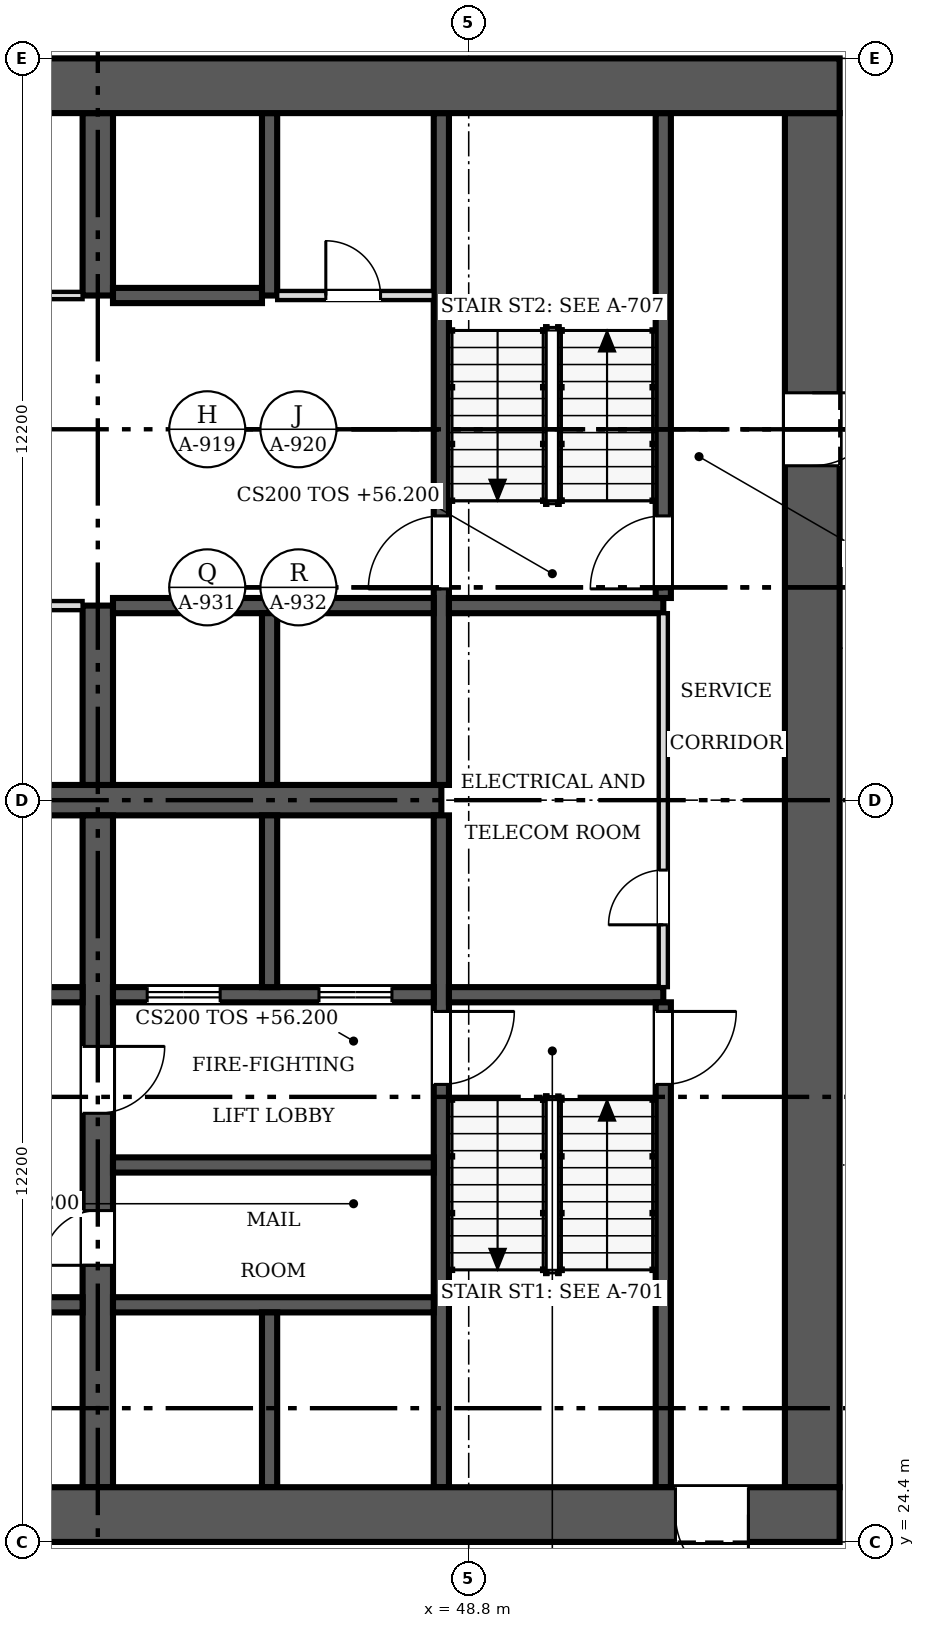
"""IFC4 building model, lengths in metres.
Left out: names, types, materials, properties, quantities, classifications, styles, units other than length and angle.
Written with IfcOpenShell. Run it as: python <this file> out.ifc"""

import sys

from ifc_helpers import new_model, si_unit, direction, frame, frame_2d, origin, place, context, subcontext, project, spatial, rectangle, extrude, source, transform, mapped, element, fill, save


model = new_model("IFC4")
c1 = context("Model", 3, precision=1e-05, world=origin(), true_north=direction((0.0, 1.0)))
c2 = subcontext(c1, "Body", "Model", "MODEL_VIEW")
j1 = project(units=[si_unit("LENGTHUNIT", "METRE"), si_unit("PLANEANGLEUNIT", "RADIAN")], contexts=[c1])
p1 = place(None, origin())
s1 = spatial("IfcSite", under=j1, at=p1, CompositionType="ELEMENT")
p2 = place(p1, origin())
s2 = spatial("IfcBuilding", under=s1, at=p2, CompositionType="ELEMENT")
p3 = place(p2, frame((0.0, 0.0, 56.2)))
s3 = spatial("IfcBuildingStorey", under=s2, at=p3, CompositionType="ELEMENT", Elevation=56.2)
p4 = place(p3, frame((54.9, 24.85, 0.0), z_axis=(0.0, 0.0, 1.0), x_axis=(-1.0, 0.0, 0.0)))
e1 = element("IfcWall", 1, at=p4, inside=s3, PredefinedType="SHEAR", context=c2, shape_type="SweptSolid", body=[
    extrude(rectangle(XDim=24.4, YDim=0.9, at=frame_2d((12.2, 0.0))), origin(), (0.0, 0.0, 1.0), 3.8),
])
m1 = source(origin(), c2, "Body", "SweptSolid", [
    extrude(rectangle(XDim=1.2, YDim=2.1, at=frame_2d((0.6, 1.05))), frame((0.0, 0.46, 0.0), z_axis=(0.0, -1.0, 0.0), x_axis=(1.0, 0.0, 0.0)), (0.0, 0.0, 1.0), 0.92),
])
p5 = place(p4, frame((1.5, 0.0, 0.0)))
e2 = element("IfcOpeningElement", 2, at=p5, cuts=e1, PredefinedType="OPENING", context=c2, shape_type="MappedRepresentation", body=[
    mapped(m1, transform((0.0, 0.0, 0.0), scale=1.0)),
])
p6 = place(p3, frame((30.5, 48.35, 0.0), z_axis=(0.0, 0.0, 1.0), x_axis=(1.0, 0.0, 0.0)))
e3 = element("IfcWall", 3, at=p6, inside=s3, PredefinedType="SHEAR", context=c2, shape_type="SweptSolid", body=[
    extrude(rectangle(XDim=24.4, YDim=0.9, at=frame_2d((12.2, 0.0))), origin(), (0.0, 0.0, 1.0), 3.8),
])
p7 = place(p3, frame((54.45, 47.9, 0.0), z_axis=(0.0, 0.0, 1.0), x_axis=(0.0, -1.0, 0.0)))
e4 = element("IfcWall", 4, at=p7, inside=s3, PredefinedType="SHEAR", context=c2, shape_type="SweptSolid", body=[
    extrude(rectangle(XDim=22.6, YDim=0.9, at=frame_2d((11.3, 0.0))), origin(), (0.0, 0.0, 1.0), 3.8),
])
p8 = place(p7, frame((4.6, 0.0, 0.0)))
e5 = element("IfcOpeningElement", 5, at=p8, cuts=e4, PredefinedType="OPENING", context=c2, shape_type="MappedRepresentation", body=[
    mapped(m1, transform((0.0, 0.0, 0.0), scale=1.0)),
])
p9 = place(p3, frame((31.4, 36.6, 0.0), z_axis=(0.0, 0.0, 1.0), x_axis=(1.0, 0.0, 0.0)))
e6 = element("IfcWall", 6, at=p9, inside=s3, PredefinedType="SHEAR", context=c2, shape_type="SweptSolid", body=[
    extrude(rectangle(XDim=16.95, YDim=0.5, at=frame_2d((8.475, 0.0))), origin(), (0.0, 0.0, 1.0), 3.8),
])
p10 = place(p3, frame((42.7, 36.35, 0.0), z_axis=(0.0, 0.0, 1.0), x_axis=(0.0, -1.0, 0.0)))
e7 = element("IfcWall", 7, at=p10, inside=s3, PredefinedType="SHEAR", context=c2, shape_type="SweptSolid", body=[
    extrude(rectangle(XDim=11.05, YDim=0.5, at=frame_2d((5.525, 0.0))), origin(), (0.0, 0.0, 1.0), 3.8),
])
m2 = source(origin(), c2, "Body", "SweptSolid", [
    extrude(rectangle(XDim=0.9, YDim=2.1, at=frame_2d((0.45, 1.05))), frame((0.0, 0.26, 0.0), z_axis=(0.0, -1.0, 0.0), x_axis=(1.0, 0.0, 0.0)), (0.0, 0.0, 1.0), 0.52),
])
p11 = place(p10, frame((6.5, 0.0, 0.0)))
e8 = element("IfcOpeningElement", 8, at=p11, cuts=e7, PredefinedType="OPENING", context=c2, shape_type="MappedRepresentation", body=[
    mapped(m2, transform((0.0, 0.0, 0.0), scale=1.0)),
])
m3 = source(origin(), c2, "Body", "SweptSolid", [
    extrude(rectangle(XDim=1.1, YDim=2.1, at=frame_2d((0.55, 1.05))), frame((0.0, 0.26, 0.0), z_axis=(0.0, -1.0, 0.0), x_axis=(1.0, 0.0, 0.0)), (0.0, 0.0, 1.0), 0.52),
])
p12 = place(p10, frame((3.8, 0.0, 0.0)))
e9 = element("IfcOpeningElement", 9, at=p12, cuts=e7, PredefinedType="OPENING", context=c2, shape_type="MappedRepresentation", body=[
    mapped(m3, transform((0.0, 0.0, 0.0), scale=1.0)),
])
p13 = place(p3, frame((42.7, 36.85, 0.0), z_axis=(0.0, 0.0, 1.0), x_axis=(0.0, 1.0, 0.0)))
e10 = element("IfcWall", 10, at=p13, inside=s3, PredefinedType="SHEAR", context=c2, shape_type="SweptSolid", body=[
    extrude(rectangle(XDim=2.95, YDim=0.5, at=frame_2d((1.475, 0.0))), origin(), (0.0, 0.0, 1.0), 3.8),
])
p14 = place(p3, frame((42.7, 44.9, 0.0), z_axis=(0.0, 0.0, 1.0), x_axis=(0.0, 1.0, 0.0)))
e11 = element("IfcWall", 11, at=p14, inside=s3, PredefinedType="SHEAR", context=c2, shape_type="SweptSolid", body=[
    extrude(rectangle(XDim=3.0, YDim=0.5, at=frame_2d((1.5, 0.0))), origin(), (0.0, 0.0, 1.0), 3.8),
])
p15 = place(p3, frame((48.35, 36.35, 0.0), z_axis=(0.0, 0.0, 1.0), x_axis=(0.0, -1.0, 0.0)))
e12 = element("IfcWall", 12, at=p15, inside=s3, PredefinedType="SOLIDWALL", context=c2, shape_type="SweptSolid", body=[
    extrude(rectangle(XDim=11.05, YDim=0.25, at=frame_2d((5.525, 0.0))), origin(), (0.0, 0.0, 1.0), 3.8),
])
m4 = source(origin(), c2, "Body", "SweptSolid", [
    extrude(rectangle(XDim=1.2, YDim=2.1, at=frame_2d((0.6, 1.05))), frame((0.0, 0.135, 0.0), z_axis=(0.0, -1.0, 0.0), x_axis=(1.0, 0.0, 0.0)), (0.0, 0.0, 1.0), 0.27),
])
p16 = place(p15, frame((3.225, 0.0, 0.0)))
e13 = element("IfcOpeningElement", 13, at=p16, cuts=e12, PredefinedType="OPENING", context=c2, shape_type="MappedRepresentation", body=[
    mapped(m4, transform((0.0, 0.0, 0.0), scale=1.0)),
])
p17 = place(p3, frame((48.35, 47.9, 0.0), z_axis=(0.0, 0.0, 1.0), x_axis=(0.0, -1.0, 0.0)))
e14 = element("IfcWall", 14, at=p17, inside=s3, PredefinedType="SOLIDWALL", context=c2, shape_type="SweptSolid", body=[
    extrude(rectangle(XDim=11.05, YDim=0.25, at=frame_2d((5.525, 0.0))), origin(), (0.0, 0.0, 1.0), 3.8),
])
p18 = place(p17, frame((6.625, 0.0, 0.0)))
e15 = element("IfcOpeningElement", 15, at=p18, cuts=e14, PredefinedType="OPENING", context=c2, shape_type="MappedRepresentation", body=[
    mapped(m4, transform((0.0, 0.0, 0.0), scale=1.0)),
])
p19 = place(p3, frame((42.45, 33.4, 0.0), z_axis=(0.0, 0.0, 1.0), x_axis=(-1.0, 0.0, 0.0)))
e16 = element("IfcWall", 16, at=p19, inside=s3, PredefinedType="SOLIDWALL", context=c2, shape_type="SweptSolid", body=[
    extrude(rectangle(XDim=11.05, YDim=0.25, at=frame_2d((5.525, 0.0))), origin(), (0.0, 0.0, 1.0), 3.8),
])
m5 = source(origin(), c2, "Body", "SweptSolid", [
    extrude(rectangle(XDim=1.1, YDim=2.1, at=frame_2d((0.55, 1.05))), frame((0.0, 0.135, 0.0), z_axis=(0.0, -1.0, 0.0), x_axis=(1.0, 0.0, 0.0)), (0.0, 0.0, 1.0), 0.27),
])
p20 = place(p19, frame((9.087, 0.0, 0.0)))
e17 = element("IfcOpeningElement", 17, at=p20, cuts=e16, PredefinedType="OPENING", context=c2, shape_type="MappedRepresentation", body=[
    mapped(m5, transform((0.0, 0.0, 0.0), scale=1.0)),
])
p21 = place(p19, frame((6.262, 0.0, 0.0)))
e18 = element("IfcOpeningElement", 18, at=p21, cuts=e16, PredefinedType="OPENING", context=c2, shape_type="MappedRepresentation", body=[
    mapped(m5, transform((0.0, 0.0, 0.0), scale=1.0)),
])
p22 = place(p19, frame((3.438, 0.0, 0.0)))
e19 = element("IfcOpeningElement", 19, at=p22, cuts=e16, PredefinedType="OPENING", context=c2, shape_type="MappedRepresentation", body=[
    mapped(m5, transform((0.0, 0.0, 0.0), scale=1.0)),
])
p23 = place(p19, frame((0.613, 0.0, 0.0)))
e20 = element("IfcOpeningElement", 20, at=p23, cuts=e16, PredefinedType="OPENING", context=c2, shape_type="MappedRepresentation", body=[
    mapped(m5, transform((0.0, 0.0, 0.0), scale=1.0)),
])
p24 = place(p3, frame((48.225, 33.4, 0.0), z_axis=(0.0, 0.0, 1.0), x_axis=(-1.0, 0.0, 0.0)))
e21 = element("IfcWall", 21, at=p24, inside=s3, PredefinedType="SOLIDWALL", context=c2, shape_type="SweptSolid", body=[
    extrude(rectangle(XDim=5.275, YDim=0.25, at=frame_2d((2.638, 0.0))), origin(), (0.0, 0.0, 1.0), 3.8),
])
p25 = place(p24, frame((3.512, 0.0, 0.0)))
e22 = element("IfcOpeningElement", 22, at=p25, cuts=e21, PredefinedType="OPENING", context=c2, shape_type="MappedRepresentation", body=[
    mapped(m4, transform((0.0, 0.0, 0.0), scale=1.0)),
])
p26 = place(p24, frame((0.688, 0.0, 0.0)))
e23 = element("IfcOpeningElement", 23, at=p26, cuts=e21, PredefinedType="OPENING", context=c2, shape_type="MappedRepresentation", body=[
    mapped(m4, transform((0.0, 0.0, 0.0), scale=1.0)),
])
p27 = place(p3, frame((48.475, 33.4, 0.0), z_axis=(0.0, 0.0, 1.0), x_axis=(1.0, 0.0, 0.0)))
e24 = element("IfcWall", 24, at=p27, inside=s3, PredefinedType="SOLIDWALL", context=c2, shape_type="SweptSolid", body=[
    extrude(rectangle(XDim=3.525, YDim=0.25, at=frame_2d((1.762, 0.0))), origin(), (0.0, 0.0, 1.0), 3.8),
])
p28 = place(p3, frame((31.4, 28.3, 0.0), z_axis=(0.0, 0.0, 1.0), x_axis=(1.0, 0.0, 0.0)))
e25 = element("IfcWall", 25, at=p28, inside=s3, PredefinedType="SOLIDWALL", context=c2, shape_type="SweptSolid", body=[
    extrude(rectangle(XDim=11.05, YDim=0.25, at=frame_2d((5.525, 0.0))), origin(), (0.0, 0.0, 1.0), 3.8),
])
p29 = place(p28, frame((0.863, 0.0, 0.0)))
e26 = element("IfcOpeningElement", 26, at=p29, cuts=e25, PredefinedType="OPENING", context=c2, shape_type="MappedRepresentation", body=[
    mapped(m5, transform((0.0, 0.0, 0.0), scale=1.0)),
])
p30 = place(p28, frame((3.688, 0.0, 0.0)))
e27 = element("IfcOpeningElement", 27, at=p30, cuts=e25, PredefinedType="OPENING", context=c2, shape_type="MappedRepresentation", body=[
    mapped(m5, transform((0.0, 0.0, 0.0), scale=1.0)),
])
p31 = place(p28, frame((6.512, 0.0, 0.0)))
e28 = element("IfcOpeningElement", 28, at=p31, cuts=e25, PredefinedType="OPENING", context=c2, shape_type="MappedRepresentation", body=[
    mapped(m5, transform((0.0, 0.0, 0.0), scale=1.0)),
])
p32 = place(p28, frame((9.337, 0.0, 0.0)))
e29 = element("IfcOpeningElement", 29, at=p32, cuts=e25, PredefinedType="OPENING", context=c2, shape_type="MappedRepresentation", body=[
    mapped(m5, transform((0.0, 0.0, 0.0), scale=1.0)),
])
for number, where, z_axis, x_axis in (
    (30, (42.95, 28.3, 0.0), (0.0, 0.0, 1.0), (1.0, 0.0, 0.0)),
    (31, (42.95, 39.8, 0.0), (0.0, 0.0, 1.0), (1.0, 0.0, 0.0)),
):
    element("IfcWall", number, at=place(p3, frame(where, z_axis=z_axis, x_axis=x_axis)), inside=s3, PredefinedType="SOLIDWALL", context=c2, shape_type="SweptSolid", body=[
        extrude(rectangle(XDim=5.275, YDim=0.25, at=frame_2d((2.638, 0.0))), origin(), (0.0, 0.0, 1.0), 3.8),
    ])
p33 = place(p3, frame((48.475, 39.8, 0.0), z_axis=(0.0, 0.0, 1.0), x_axis=(1.0, 0.0, 0.0)))
e32 = element("IfcWall", 32, at=p33, inside=s3, PredefinedType="SOLIDWALL", context=c2, shape_type="SweptSolid", body=[
    extrude(rectangle(XDim=3.525, YDim=0.25, at=frame_2d((1.762, 0.0))), origin(), (0.0, 0.0, 1.0), 3.8),
])
p34 = place(p3, frame((52.0, 25.3, 0.0), z_axis=(0.0, 0.0, 1.0), x_axis=(0.0, 1.0, 0.0)))
e33 = element("IfcWall", 33, at=p34, inside=s3, PredefinedType="SOLIDWALL", context=c2, shape_type="SweptSolid", body=[
    extrude(rectangle(XDim=7.975, YDim=0.25, at=frame_2d((3.987, 0.0))), origin(), (0.0, 0.0, 1.0), 3.8),
])
p35 = place(p34, frame((6.625, 0.0, 0.0)))
e34 = element("IfcOpeningElement", 34, at=p35, cuts=e33, PredefinedType="OPENING", context=c2, shape_type="MappedRepresentation", body=[
    mapped(m4, transform((0.0, 0.0, 0.0), scale=1.0)),
])
p36 = place(p3, frame((52.0, 39.925, 0.0), z_axis=(0.0, 0.0, 1.0), x_axis=(0.0, 1.0, 0.0)))
e35 = element("IfcWall", 35, at=p36, inside=s3, PredefinedType="SOLIDWALL", context=c2, shape_type="SweptSolid", body=[
    extrude(rectangle(XDim=7.975, YDim=0.25, at=frame_2d((3.987, 0.0))), origin(), (0.0, 0.0, 1.0), 3.8),
])
p37 = place(p36, frame((0.15, 0.0, 0.0)))
e36 = element("IfcOpeningElement", 36, at=p37, cuts=e35, PredefinedType="OPENING", context=c2, shape_type="MappedRepresentation", body=[
    mapped(m4, transform((0.0, 0.0, 0.0), scale=1.0)),
])
p38 = place(p3, frame((45.525, 33.525, 0.0), z_axis=(0.0, 0.0, 1.0), x_axis=(0.0, 1.0, 0.0)))
e37 = element("IfcWall", 37, at=p38, inside=s3, PredefinedType="SOLIDWALL", context=c2, shape_type="SweptSolid", body=[
    extrude(rectangle(XDim=2.825, YDim=0.25, at=frame_2d((1.413, 0.0))), origin(), (0.0, 0.0, 1.0), 3.8),
])
p39 = place(p3, frame((45.525, 36.85, 0.0), z_axis=(0.0, 0.0, 1.0), x_axis=(0.0, 1.0, 0.0)))
e38 = element("IfcWall", 38, at=p39, inside=s3, PredefinedType="SOLIDWALL", context=c2, shape_type="SweptSolid", body=[
    extrude(rectangle(XDim=2.825, YDim=0.25, at=frame_2d((1.413, 0.0))), origin(), (0.0, 0.0, 1.0), 3.8),
])
p40 = place(p3, frame((42.95, 30.6, 0.0), z_axis=(0.0, 0.0, 1.0), x_axis=(1.0, 0.0, 0.0)))
e39 = element("IfcWall", 39, at=p40, inside=s3, PredefinedType="SOLIDWALL", context=c2, shape_type="SweptSolid", body=[
    extrude(rectangle(XDim=5.275, YDim=0.25, at=frame_2d((2.638, 0.0))), origin(), (0.0, 0.0, 1.0), 3.8),
])
p41 = place(p3, frame((45.525, 25.3, 0.0), z_axis=(0.0, 0.0, 1.0), x_axis=(0.0, 1.0, 0.0)))
e40 = element("IfcWall", 40, at=p41, inside=s3, PredefinedType="SOLIDWALL", context=c2, shape_type="SweptSolid", body=[
    extrude(rectangle(XDim=2.875, YDim=0.25, at=frame_2d((1.438, 0.0))), origin(), (0.0, 0.0, 1.0), 3.8),
])
p42 = place(p3, frame((45.525, 44.9, 0.0), z_axis=(0.0, 0.0, 1.0), x_axis=(0.0, 1.0, 0.0)))
e41 = element("IfcWall", 41, at=p42, inside=s3, PredefinedType="SOLIDWALL", context=c2, shape_type="SweptSolid", body=[
    extrude(rectangle(XDim=3.0, YDim=0.25, at=frame_2d((1.5, 0.0))), origin(), (0.0, 0.0, 1.0), 3.8),
])
p43 = place(p3, frame((42.95, 44.9, 0.0), z_axis=(0.0, 0.0, 1.0), x_axis=(1.0, 0.0, 0.0)))
e42 = element("IfcWall", 42, at=p43, inside=s3, PredefinedType="SOLIDWALL", context=c2, shape_type="SweptSolid", body=[
    extrude(rectangle(XDim=2.45, YDim=0.25, at=frame_2d((1.225, 0.0))), origin(), (0.0, 0.0, 1.0), 3.8),
])
p44 = place(p3, frame((42.45, 39.8, 0.0), z_axis=(0.0, 0.0, 1.0), x_axis=(-1.0, 0.0, 0.0)))
e43 = element("IfcWall", 43, at=p44, inside=s3, PredefinedType="PARTITIONING", context=c2, shape_type="SweptSolid", body=[
    extrude(rectangle(XDim=11.05, YDim=0.15, at=frame_2d((5.525, 0.0))), origin(), (0.0, 0.0, 1.0), 3.6),
])
m6 = source(origin(), c2, "Body", "SweptSolid", [
    extrude(rectangle(XDim=0.9, YDim=2.1, at=frame_2d((0.45, 1.05))), frame((0.0, 0.085, 0.0), z_axis=(0.0, -1.0, 0.0), x_axis=(1.0, 0.0, 0.0)), (0.0, 0.0, 1.0), 0.17),
])
p45 = place(p44, frame((8.712, 0.0, 0.0)))
e44 = element("IfcOpeningElement", 44, at=p45, cuts=e43, PredefinedType="OPENING", context=c2, shape_type="MappedRepresentation", body=[
    mapped(m6, transform((0.0, 0.0, 0.0), scale=1.0)),
])
p46 = place(p44, frame((4.95, 0.0, 0.0)))
e45 = element("IfcOpeningElement", 45, at=p46, cuts=e43, PredefinedType="OPENING", context=c2, shape_type="MappedRepresentation", body=[
    mapped(m6, transform((0.0, 0.0, 0.0), scale=1.0)),
])
p47 = place(p44, frame((1.188, 0.0, 0.0)))
e46 = element("IfcOpeningElement", 46, at=p47, cuts=e43, PredefinedType="OPENING", context=c2, shape_type="MappedRepresentation", body=[
    mapped(m6, transform((0.0, 0.0, 0.0), scale=1.0)),
])
p48 = place(p3, frame((31.4, 44.9, 0.0), z_axis=(0.0, 0.0, 1.0), x_axis=(1.0, 0.0, 0.0)))
e47 = element("IfcWall", 47, at=p48, inside=s3, PredefinedType="PARTITIONING", context=c2, shape_type="SweptSolid", body=[
    extrude(rectangle(XDim=11.05, YDim=0.12, at=frame_2d((5.525, 0.0))), origin(), (0.0, 0.0, 1.0), 3.6),
])
m7 = source(origin(), c2, "Body", "SweptSolid", [
    extrude(rectangle(XDim=0.9, YDim=2.1, at=frame_2d((0.45, 1.05))), frame((0.0, 0.07, 0.0), z_axis=(0.0, -1.0, 0.0), x_axis=(1.0, 0.0, 0.0)), (0.0, 0.0, 1.0), 0.14),
])
p49 = place(p48, frame((0.962, 0.0, 0.0)))
e48 = element("IfcOpeningElement", 48, at=p49, cuts=e47, PredefinedType="OPENING", context=c2, shape_type="MappedRepresentation", body=[
    mapped(m7, transform((0.0, 0.0, 0.0), scale=1.0)),
])
p50 = place(p48, frame((6.613, 0.0, 0.0)))
e49 = element("IfcOpeningElement", 49, at=p50, cuts=e47, PredefinedType="OPENING", context=c2, shape_type="MappedRepresentation", body=[
    mapped(m7, transform((0.0, 0.0, 0.0), scale=1.0)),
])
p51 = place(p3, frame((52.0, 33.525, 0.0), z_axis=(0.0, 0.0, 1.0), x_axis=(0.0, 1.0, 0.0)))
e50 = element("IfcWall", 50, at=p51, inside=s3, PredefinedType="PARTITIONING", context=c2, shape_type="SweptSolid", body=[
    extrude(rectangle(XDim=6.15, YDim=0.15, at=frame_2d((3.075, 0.0))), origin(), (0.0, 0.0, 1.0), 3.6),
])
p52 = place(p51, frame((1.025, 0.0, 0.0)))
e51 = element("IfcOpeningElement", 51, at=p52, cuts=e50, PredefinedType="OPENING", context=c2, shape_type="MappedRepresentation", body=[
    mapped(m6, transform((0.0, 0.0, 0.0), scale=1.0)),
])
p53 = place(p3, frame((45.65, 44.9, 0.0), z_axis=(0.0, 0.0, 1.0), x_axis=(1.0, 0.0, 0.0)))
e52 = element("IfcWall", 52, at=p53, inside=s3, PredefinedType="PARTITIONING", context=c2, shape_type="SweptSolid", body=[
    extrude(rectangle(XDim=2.575, YDim=0.15, at=frame_2d((1.288, 0.0))), origin(), (0.0, 0.0, 1.0), 3.6),
])
p54 = place(p53, frame((0.8, 0.0, 0.0)))
e53 = element("IfcOpeningElement", 53, at=p54, cuts=e52, PredefinedType="OPENING", context=c2, shape_type="MappedRepresentation", body=[
    mapped(m6, transform((0.0, 0.0, 0.0), scale=1.0)),
])
m8 = source(origin(), c2, "Body", "SweptSolid", [
    extrude(rectangle(XDim=1.2, YDim=2.1, at=frame_2d((0.6, 1.05))), frame((0.0, 0.025, 0.0), z_axis=(0.0, -1.0, 0.0), x_axis=(1.0, 0.0, 0.0)), (0.0, 0.0, 1.0), 0.05),
])
p55 = place(p5, origin())
e54 = element("IfcDoor", 54, at=p55, inside=s3, OperationType="SINGLE_SWING_LEFT", PredefinedType="DOOR", context=c2, shape_type="MappedRepresentation", body=[
    mapped(m8, transform((0.0, 0.0, 0.0), scale=1.0)),
])
fill(e2, e54)
p56 = place(p8, origin())
e55 = element("IfcDoor", 55, at=p56, inside=s3, OperationType="SINGLE_SWING_LEFT", PredefinedType="DOOR", context=c2, shape_type="MappedRepresentation", body=[
    mapped(m8, transform((0.0, 0.0, 0.0), scale=1.0)),
])
fill(e5, e55)
m9 = source(origin(), c2, "Body", "SweptSolid", [
    extrude(rectangle(XDim=0.9, YDim=2.1, at=frame_2d((0.45, 1.05))), frame((0.0, 0.025, 0.0), z_axis=(0.0, -1.0, 0.0), x_axis=(1.0, 0.0, 0.0)), (0.0, 0.0, 1.0), 0.05),
])
p57 = place(p11, origin())
e56 = element("IfcDoor", 56, at=p57, inside=s3, OperationType="SINGLE_SWING_RIGHT", PredefinedType="DOOR", context=c2, shape_type="MappedRepresentation", body=[
    mapped(m9, transform((0.0, 0.0, 0.0), scale=1.0)),
])
fill(e8, e56)
m10 = source(origin(), c2, "Body", "SweptSolid", [
    extrude(rectangle(XDim=1.1, YDim=2.1, at=frame_2d((0.55, 1.05))), frame((0.0, 0.025, 0.0), z_axis=(0.0, -1.0, 0.0), x_axis=(1.0, 0.0, 0.0)), (0.0, 0.0, 1.0), 0.05),
])
p58 = place(p12, origin())
e57 = element("IfcDoor", 57, at=p58, inside=s3, OperationType="SINGLE_SWING_LEFT", PredefinedType="DOOR", context=c2, shape_type="MappedRepresentation", body=[
    mapped(m10, transform((0.0, 0.0, 0.0), scale=1.0)),
])
fill(e9, e57)
p59 = place(p16, origin())
e58 = element("IfcDoor", 58, at=p59, inside=s3, OperationType="SINGLE_SWING_LEFT", PredefinedType="DOOR", context=c2, shape_type="MappedRepresentation", body=[
    mapped(m8, transform((0.0, 0.0, 0.0), scale=1.0)),
])
fill(e13, e58)
p60 = place(p18, origin())
e59 = element("IfcDoor", 59, at=p60, inside=s3, OperationType="SINGLE_SWING_RIGHT", PredefinedType="DOOR", context=c2, shape_type="MappedRepresentation", body=[
    mapped(m8, transform((0.0, 0.0, 0.0), scale=1.0)),
])
fill(e15, e59)
p61 = place(p25, origin())
e60 = element("IfcDoor", 60, at=p61, inside=s3, OperationType="DOUBLE_DOOR_SLIDING", PredefinedType="DOOR", context=c2, shape_type="MappedRepresentation", body=[
    mapped(m8, transform((0.0, 0.0, 0.0), scale=1.0)),
])
fill(e22, e60)
p62 = place(p26, origin())
e61 = element("IfcDoor", 61, at=p62, inside=s3, OperationType="DOUBLE_DOOR_SLIDING", PredefinedType="DOOR", context=c2, shape_type="MappedRepresentation", body=[
    mapped(m8, transform((0.0, 0.0, 0.0), scale=1.0)),
])
fill(e23, e61)
p63 = place(p35, origin())
e62 = element("IfcDoor", 62, at=p63, inside=s3, OperationType="SINGLE_SWING_RIGHT", PredefinedType="DOOR", context=c2, shape_type="MappedRepresentation", body=[
    mapped(m8, transform((0.0, 0.0, 0.0), scale=1.0)),
])
fill(e34, e62)
p64 = place(p37, origin())
e63 = element("IfcDoor", 63, at=p64, inside=s3, OperationType="SINGLE_SWING_LEFT", PredefinedType="DOOR", context=c2, shape_type="MappedRepresentation", body=[
    mapped(m8, transform((0.0, 0.0, 0.0), scale=1.0)),
])
fill(e36, e63)
p65 = place(p52, origin())
e64 = element("IfcDoor", 64, at=p65, inside=s3, OperationType="SINGLE_SWING_LEFT", PredefinedType="DOOR", context=c2, shape_type="MappedRepresentation", body=[
    mapped(m9, transform((0.0, 0.0, 0.0), scale=1.0)),
])
fill(e51, e64)
p66 = place(p54, origin())
e65 = element("IfcDoor", 65, at=p66, inside=s3, OperationType="SINGLE_SWING_LEFT", PredefinedType="DOOR", context=c2, shape_type="MappedRepresentation", body=[
    mapped(m9, transform((0.0, 0.0, 0.0), scale=1.0)),
])
fill(e53, e65)
save(model, sys.argv[1])
